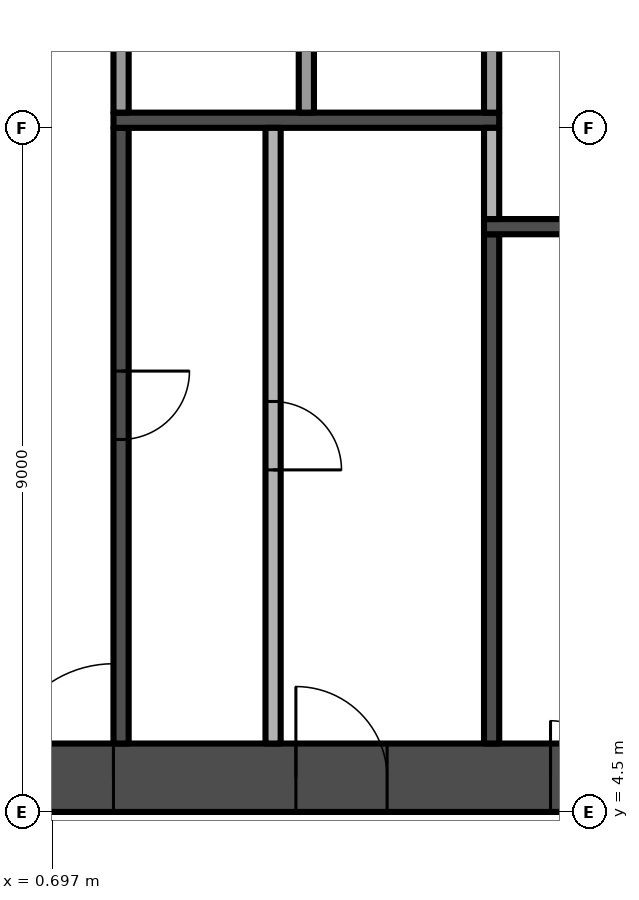
"""IFC4 building model, lengths in metres.
Left out: names, types, materials, properties, quantities, classifications, styles, units other than length and angle.
Written with IfcOpenShell. Run it as: python <this file> out.ifc"""

import sys

from ifc_helpers import new_model, si_unit, direction, frame, frame_2d, origin, place, context, subcontext, project, spatial, rectangle, extrude, element, fill, save


model = new_model("IFC4")
c1 = context("Model", 3, precision=1e-05, world=origin(), true_north=direction((0.0, 1.0)))
c2 = subcontext(c1, "Body", "Model", "MODEL_VIEW")
j1 = project(units=[si_unit("LENGTHUNIT", "METRE"), si_unit("PLANEANGLEUNIT", "RADIAN")], contexts=[c1])
p1 = place(None, origin())
s1 = spatial("IfcSite", under=j1, at=p1, CompositionType="ELEMENT")
p2 = place(p1, origin())
s2 = spatial("IfcBuilding", under=s1, at=p2, CompositionType="ELEMENT")
p3 = place(p2, frame((0.0, 0.0, 30.2)))
s3 = spatial("IfcBuildingStorey", under=s2, at=p3, CompositionType="ELEMENT", Elevation=30.2)
p4 = place(p3, frame((-13.5, 4.95, -0.3), z_axis=(0.0, 0.0, 1.0), x_axis=(1.0, 0.0, 0.0)))
e1 = element("IfcWall", 1, at=p4, inside=s3, PredefinedType="SHEAR", context=c2, shape_type="SweptSolid", body=[
    extrude(rectangle(XDim=27.0, YDim=0.9, at=frame_2d((13.5, 0.0))), origin(), (0.0, 0.0, 1.0), 3.8),
])
p5 = place(p4, frame((12.0, 0.0, 0.3)))
e2 = element("IfcOpeningElement", 2, at=p5, cuts=e1, PredefinedType="OPENING", context=c2, shape_type="SweptSolid", body=[
    extrude(rectangle(XDim=3.0, YDim=2.4, at=frame_2d((1.5, 1.2))), frame((0.0, 0.46, 0.0), z_axis=(0.0, -1.0, 0.0), x_axis=(1.0, 0.0, 0.0)), (0.0, 0.0, 1.0), 0.92),
])
p6 = place(p4, frame((4.9, 0.0, 0.3)))
e3 = element("IfcOpeningElement", 3, at=p6, cuts=e1, PredefinedType="OPENING", context=c2, shape_type="SweptSolid", body=[
    extrude(rectangle(XDim=1.2, YDim=2.2, at=frame_2d((0.6, 1.1))), frame((0.0, 0.46, 0.0), z_axis=(0.0, -1.0, 0.0), x_axis=(1.0, 0.0, 0.0)), (0.0, 0.0, 1.0), 0.92),
])
p7 = place(p4, frame((20.75, 0.0, 0.3)))
e4 = element("IfcOpeningElement", 4, at=p7, cuts=e1, PredefinedType="OPENING", context=c2, shape_type="SweptSolid", body=[
    extrude(rectangle(XDim=1.5, YDim=2.2, at=frame_2d((0.75, 1.1))), frame((0.0, 0.46, 0.0), z_axis=(0.0, -1.0, 0.0), x_axis=(1.0, 0.0, 0.0)), (0.0, 0.0, 1.0), 0.92),
])
p8 = place(p4, frame((17.4, 0.0, 0.3)))
e5 = element("IfcOpeningElement", 5, at=p8, cuts=e1, PredefinedType="OPENING", context=c2, shape_type="SweptSolid", body=[
    extrude(rectangle(XDim=1.2, YDim=2.2, at=frame_2d((0.6, 1.1))), frame((0.0, 0.46, 0.0), z_axis=(0.0, -1.0, 0.0), x_axis=(1.0, 0.0, 0.0)), (0.0, 0.0, 1.0), 0.92),
])
p9 = place(p3, frame((1.6, 13.5, 0.0), z_axis=(0.0, 0.0, 1.0), x_axis=(0.0, -1.0, 0.0)))
e6 = element("IfcWall", 6, at=p9, inside=s3, PredefinedType="SHEAR", context=c2, shape_type="SweptSolid", body=[
    extrude(rectangle(XDim=8.1, YDim=0.2, at=frame_2d((4.05, 0.0))), origin(), (0.0, 0.0, 1.0), 3.5),
])
p10 = place(p9, frame((3.2, 0.0, 0.0)))
e7 = element("IfcOpeningElement", 7, at=p10, cuts=e6, PredefinedType="OPENING", context=c2, shape_type="SweptSolid", body=[
    extrude(rectangle(XDim=0.9, YDim=2.1, at=frame_2d((0.45, 1.05))), frame((0.0, 0.11, 0.0), z_axis=(0.0, -1.0, 0.0), x_axis=(1.0, 0.0, 0.0)), (0.0, 0.0, 1.0), 0.22),
])
p11 = place(p3, frame((1.5, 13.6, 0.0), z_axis=(0.0, 0.0, 1.0), x_axis=(1.0, 0.0, 0.0)))
e8 = element("IfcWall", 8, at=p11, inside=s3, PredefinedType="SHEAR", context=c2, shape_type="SweptSolid", body=[
    extrude(rectangle(XDim=5.075, YDim=0.2, at=frame_2d((2.538, 0.0))), origin(), (0.0, 0.0, 1.0), 3.5),
])
p12 = place(p3, frame((1.6, 13.7, 0.0), z_axis=(0.0, 0.0, 1.0), x_axis=(0.0, 1.0, 0.0)))
e9 = element("IfcWall", 9, at=p12, inside=s3, PredefinedType="PARTITIONING", context=c2, shape_type="SweptSolid", body=[
    extrude(rectangle(XDim=2.2, YDim=0.2, at=frame_2d((1.1, 0.0))), origin(), (0.0, 0.0, 1.0), 3.5),
])
p13 = place(p3, frame((3.6, 13.5, 0.0), z_axis=(0.0, 0.0, 1.0), x_axis=(0.0, -1.0, 0.0)))
e10 = element("IfcWall", 10, at=p13, inside=s3, PredefinedType="PARTITIONING", context=c2, shape_type="SweptSolid", body=[
    extrude(rectangle(XDim=8.1, YDim=0.2, at=frame_2d((4.05, 0.0))), origin(), (0.0, 0.0, 1.0), 3.5),
])
p14 = place(p13, frame((3.6, 0.0, 0.0)))
e11 = element("IfcOpeningElement", 11, at=p14, cuts=e10, PredefinedType="OPENING", context=c2, shape_type="SweptSolid", body=[
    extrude(rectangle(XDim=0.9, YDim=2.1, at=frame_2d((0.45, 1.05))), frame((0.0, 0.11, 0.0), z_axis=(0.0, -1.0, 0.0), x_axis=(1.0, 0.0, 0.0)), (0.0, 0.0, 1.0), 0.22),
])
p15 = place(p3, frame((4.037, 13.7, 0.0), z_axis=(0.0, 0.0, 1.0), x_axis=(0.0, 1.0, 0.0)))
e12 = element("IfcWall", 12, at=p15, inside=s3, PredefinedType="PARTITIONING", context=c2, shape_type="SweptSolid", body=[
    extrude(rectangle(XDim=2.2, YDim=0.2, at=frame_2d((1.1, 0.0))), origin(), (0.0, 0.0, 1.0), 3.5),
])
p16 = place(p3, frame((6.475, 5.4, 0.0), z_axis=(0.0, 0.0, 1.0), x_axis=(0.0, 1.0, 0.0)))
e13 = element("IfcWall", 13, at=p16, inside=s3, PredefinedType="SHEAR", context=c2, shape_type="SweptSolid", body=[
    extrude(rectangle(XDim=6.7, YDim=0.2, at=frame_2d((3.35, 0.0))), origin(), (0.0, 0.0, 1.0), 3.5),
])
p17 = place(p3, frame((6.375, 12.2, 0.0), z_axis=(0.0, 0.0, 1.0), x_axis=(1.0, 0.0, 0.0)))
e14 = element("IfcWall", 14, at=p17, inside=s3, PredefinedType="SHEAR", context=c2, shape_type="SweptSolid", body=[
    extrude(rectangle(XDim=3.475, YDim=0.2, at=frame_2d((1.738, 0.0))), origin(), (0.0, 0.0, 1.0), 3.5),
])
p18 = place(p3, frame((6.475, 12.3, 0.0), z_axis=(0.0, 0.0, 1.0), x_axis=(0.0, 1.0, 0.0)))
e15 = element("IfcWall", 15, at=p18, inside=s3, PredefinedType="PARTITIONING", context=c2, shape_type="SweptSolid", body=[
    extrude(rectangle(XDim=1.2, YDim=0.2, at=frame_2d((0.6, 0.0))), origin(), (0.0, 0.0, 1.0), 3.5),
])
p19 = place(p3, frame((6.475, 13.7, 0.0), z_axis=(0.0, 0.0, 1.0), x_axis=(0.0, 1.0, 0.0)))
e16 = element("IfcWall", 16, at=p19, inside=s3, PredefinedType="PARTITIONING", context=c2, shape_type="SweptSolid", body=[
    extrude(rectangle(XDim=2.2, YDim=0.2, at=frame_2d((1.1, 0.0))), origin(), (0.0, 0.0, 1.0), 3.5),
])
p20 = place(p5, frame((3.0, 0.0, 0.0), z_axis=(0.0, 0.0, 1.0), x_axis=(-1.0, 0.0, 0.0)))
e17 = element("IfcDoor", 17, at=p20, inside=s3, OperationType="DOUBLE_DOOR_SINGLE_SWING", PredefinedType="DOOR", context=c2, shape_type="SweptSolid", body=[
    extrude(rectangle(XDim=3.0, YDim=2.4, at=frame_2d((1.5, 1.2))), frame((0.0, 0.025, 0.0), z_axis=(0.0, -1.0, 0.0), x_axis=(1.0, 0.0, 0.0)), (0.0, 0.0, 1.0), 0.05),
])
fill(e2, e17)
p21 = place(p7, frame((1.5, 0.0, 0.0), z_axis=(0.0, 0.0, 1.0), x_axis=(-1.0, 0.0, 0.0)))
e18 = element("IfcDoor", 18, at=p21, inside=s3, OperationType="DOUBLE_DOOR_SINGLE_SWING", PredefinedType="DOOR", context=c2, shape_type="SweptSolid", body=[
    extrude(rectangle(XDim=1.5, YDim=2.2, at=frame_2d((0.75, 1.1))), frame((0.0, 0.025, 0.0), z_axis=(0.0, -1.0, 0.0), x_axis=(1.0, 0.0, 0.0)), (0.0, 0.0, 1.0), 0.05),
])
fill(e4, e18)
p22 = place(p8, frame((1.2, 0.0, 0.0), z_axis=(0.0, 0.0, 1.0), x_axis=(-1.0, 0.0, 0.0)))
e19 = element("IfcDoor", 19, at=p22, inside=s3, OperationType="SINGLE_SWING_RIGHT", PredefinedType="DOOR", context=c2, shape_type="SweptSolid", body=[
    extrude(rectangle(XDim=1.2, YDim=2.2, at=frame_2d((0.6, 1.1))), frame((0.0, 0.025, 0.0), z_axis=(0.0, -1.0, 0.0), x_axis=(1.0, 0.0, 0.0)), (0.0, 0.0, 1.0), 0.05),
])
fill(e5, e19)
p23 = place(p10, origin())
e20 = element("IfcDoor", 20, at=p23, inside=s3, OperationType="SINGLE_SWING_LEFT", PredefinedType="DOOR", context=c2, shape_type="SweptSolid", body=[
    extrude(rectangle(XDim=0.9, YDim=2.1, at=frame_2d((0.45, 1.05))), frame((0.0, 0.025, 0.0), z_axis=(0.0, -1.0, 0.0), x_axis=(1.0, 0.0, 0.0)), (0.0, 0.0, 1.0), 0.05),
])
fill(e7, e20)
p24 = place(p14, origin())
e21 = element("IfcDoor", 21, at=p24, inside=s3, OperationType="SINGLE_SWING_RIGHT", PredefinedType="DOOR", context=c2, shape_type="SweptSolid", body=[
    extrude(rectangle(XDim=0.9, YDim=2.1, at=frame_2d((0.45, 1.05))), frame((0.0, 0.025, 0.0), z_axis=(0.0, -1.0, 0.0), x_axis=(1.0, 0.0, 0.0)), (0.0, 0.0, 1.0), 0.05),
])
fill(e11, e21)
save(model, sys.argv[1])
